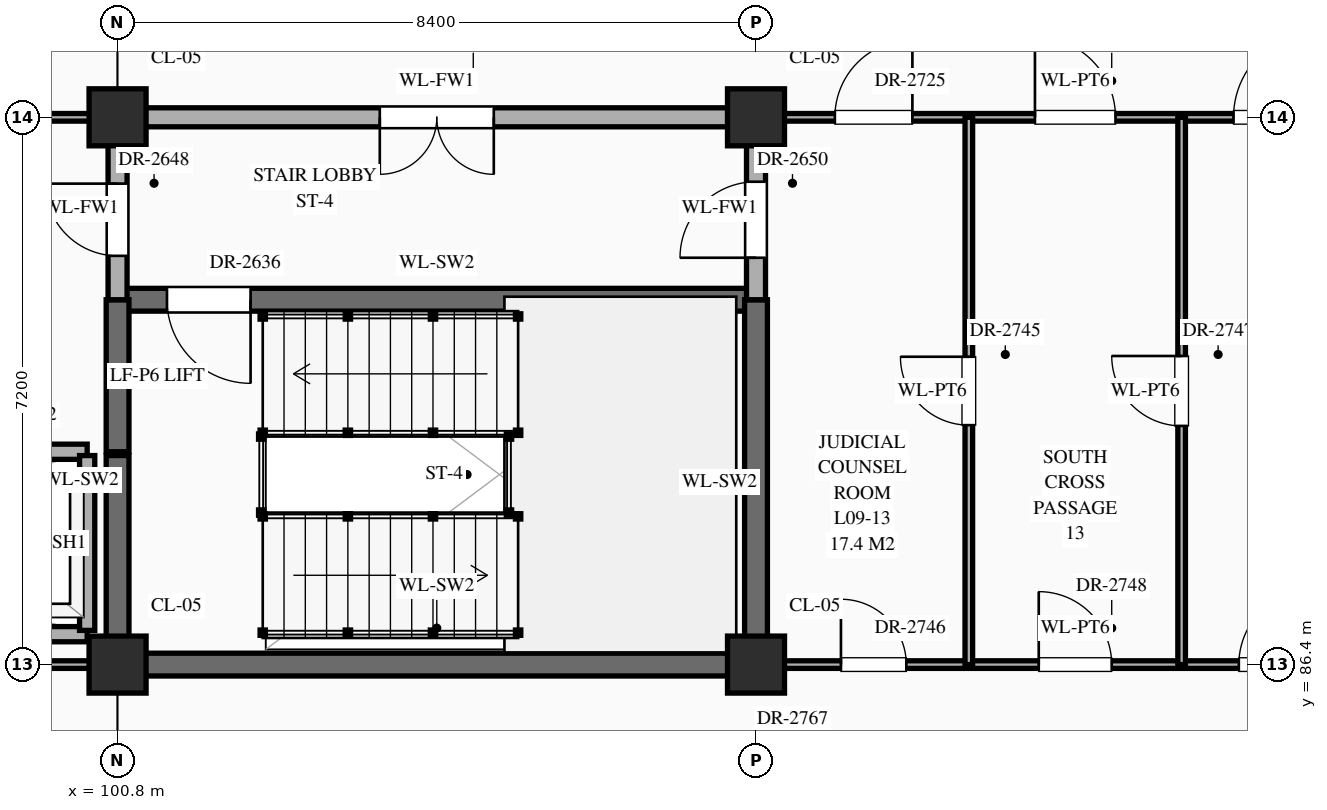
"""IFC4 building model, lengths in metres.
Left out: names, types, materials, properties, quantities, classifications, styles, units other than length and angle.
Written with IfcOpenShell. Run it as: python <this file> out.ifc"""

import sys

from ifc_helpers import new_model, si_unit, direction, frame, frame_2d, origin, origin_2d, place, context, subcontext, project, spatial, rectangle, extrude, element, fill, save


model = new_model("IFC4")
c1 = context("Model", 3, precision=1e-05, world=origin(), true_north=direction((0.0, 1.0)))
c2 = subcontext(c1, "Body", "Model", "MODEL_VIEW")
j1 = project(units=[si_unit("LENGTHUNIT", "METRE"), si_unit("PLANEANGLEUNIT", "RADIAN")], contexts=[c1])
p1 = place(None, origin())
s1 = spatial("IfcSite", under=j1, at=p1, CompositionType="ELEMENT")
p2 = place(p1, origin())
s2 = spatial("IfcBuilding", under=s1, at=p2, CompositionType="ELEMENT")
p3 = place(p2, frame((0.0, 0.0, 39.3)))
s3 = spatial("IfcBuildingStorey", under=s2, at=p3, CompositionType="ELEMENT", Elevation=39.3)
for number, where, z_axis, x_axis in (
    (1, (100.8, 86.4, 0.0), (0.0, 0.0, 1.0), (1.0, 0.0, 0.0)),
    (2, (100.8, 93.6, 0.0), (0.0, 0.0, 1.0), (1.0, 0.0, 0.0)),
    (3, (109.2, 86.4, 0.0), (0.0, 0.0, 1.0), (1.0, 0.0, 0.0)),
    (4, (109.2, 93.6, 0.0), (0.0, 0.0, 1.0), (1.0, 0.0, 0.0)),
):
    element("IfcColumn", number, at=place(p3, frame(where, z_axis=z_axis, x_axis=x_axis)), inside=s3, PredefinedType="COLUMN", context=c2, shape_type="SweptSolid", body=[
        extrude(rectangle(XDim=0.75, YDim=0.75, at=origin_2d()), origin(), (0.0, 0.0, 1.0), 4.2),
    ])
p4 = place(p3, frame((92.45, 86.4, 0.0), z_axis=(0.0, 0.0, 1.0), x_axis=(1.0, 0.0, 0.0)))
e5 = element("IfcWall", 5, at=p4, inside=s3, PredefinedType="STANDARD", context=c2, shape_type="SweptSolid", body=[
    extrude(rectangle(XDim=8.3, YDim=0.1, at=frame_2d((4.15, 0.0))), origin(), (0.0, 0.0, 1.0), 3.1),
])
p5 = place(p3, frame((100.8, 86.4, 0.0), z_axis=(0.0, 0.0, 1.0), x_axis=(1.0, 0.0, 0.0)))
e6 = element("IfcWall", 6, at=p5, inside=s3, PredefinedType="SHEAR", context=c2, shape_type="SweptSolid", body=[
    extrude(rectangle(XDim=8.4, YDim=0.3, at=frame_2d((4.2, 0.0))), origin(), (0.0, 0.0, 1.0), 3.95),
])
p6 = place(p3, frame((109.2, 86.4, 0.0), z_axis=(0.0, 0.0, 1.0), x_axis=(1.0, 0.0, 0.0)))
e7 = element("IfcWall", 7, at=p6, inside=s3, PredefinedType="STANDARD", context=c2, shape_type="SweptSolid", body=[
    extrude(rectangle(XDim=8.4, YDim=0.1, at=frame_2d((4.2, 0.0))), origin(), (0.0, 0.0, 1.0), 3.1),
])
p7 = place(p6, frame((1.117, 0.0, 0.0)))
e8 = element("IfcOpeningElement", 8, at=p7, cuts=e7, PredefinedType="OPENING", context=c2, shape_type="SweptSolid", body=[
    extrude(rectangle(XDim=0.86, YDim=2.1, at=frame_2d((0.43, 1.05))), frame((0.0, 0.062, 0.0), z_axis=(0.0, -1.0, 0.0), x_axis=(1.0, 0.0, 0.0)), (0.0, 0.0, 1.0), 0.124),
])
p8 = place(p6, frame((3.72, 0.0, 0.0)))
e9 = element("IfcOpeningElement", 9, at=p8, cuts=e7, PredefinedType="OPENING", context=c2, shape_type="SweptSolid", body=[
    extrude(rectangle(XDim=0.96, YDim=2.2, at=frame_2d((0.48, 1.1))), frame((0.0, 0.062, 0.0), z_axis=(0.0, -1.0, 0.0), x_axis=(1.0, 0.0, 0.0)), (0.0, 0.0, 1.0), 0.124),
])
p9 = place(p6, frame((6.353, 0.0, 0.0)))
e10 = element("IfcOpeningElement", 10, at=p9, cuts=e7, PredefinedType="OPENING", context=c2, shape_type="SweptSolid", body=[
    extrude(rectangle(XDim=1.0, YDim=2.25, at=frame_2d((0.5, 1.125))), frame((0.0, 0.062, 0.0), z_axis=(0.0, -1.0, 0.0), x_axis=(1.0, 0.0, 0.0)), (0.0, 0.0, 1.0), 0.124),
])
p10 = place(p3, frame((97.9, 86.8, 0.0), z_axis=(0.0, 0.0, 1.0), x_axis=(1.0, 0.0, 0.0)))
e11 = element("IfcWall", 11, at=p10, inside=s3, PredefinedType="STANDARD", context=c2, shape_type="SweptSolid", body=[
    extrude(rectangle(XDim=2.5, YDim=0.2, at=frame_2d((1.25, 0.0))), origin(), (0.0, 0.0, 1.0), 3.95),
])
p11 = place(p3, frame((92.7, 89.2, 0.0), z_axis=(0.0, 0.0, 1.0), x_axis=(1.0, 0.0, 0.0)))
e12 = element("IfcWall", 12, at=p11, inside=s3, PredefinedType="STANDARD", context=c2, shape_type="SweptSolid", body=[
    extrude(rectangle(XDim=7.7, YDim=0.2, at=frame_2d((3.85, 0.0))), origin(), (0.0, 0.0, 1.0), 3.95),
])
p12 = place(p11, frame((0.725, 0.0, 0.0)))
e13 = element("IfcOpeningElement", 13, at=p12, cuts=e12, PredefinedType="OPENING", context=c2, shape_type="SweptSolid", body=[
    extrude(rectangle(XDim=1.1, YDim=2.15, at=frame_2d((0.55, 1.075))), frame((0.0, 0.112, 0.0), z_axis=(0.0, -1.0, 0.0), x_axis=(1.0, 0.0, 0.0)), (0.0, 0.0, 1.0), 0.224),
])
p13 = place(p11, frame((3.3, 0.0, 0.0)))
e14 = element("IfcOpeningElement", 14, at=p13, cuts=e12, PredefinedType="OPENING", context=c2, shape_type="SweptSolid", body=[
    extrude(rectangle(XDim=1.1, YDim=2.15, at=frame_2d((0.55, 1.075))), frame((0.0, 0.112, 0.0), z_axis=(0.0, -1.0, 0.0), x_axis=(1.0, 0.0, 0.0)), (0.0, 0.0, 1.0), 0.224),
])
p14 = place(p11, frame((5.875, 0.0, 0.0)))
e15 = element("IfcOpeningElement", 15, at=p14, cuts=e12, PredefinedType="OPENING", context=c2, shape_type="SweptSolid", body=[
    extrude(rectangle(XDim=1.1, YDim=2.15, at=frame_2d((0.55, 1.075))), frame((0.0, 0.112, 0.0), z_axis=(0.0, -1.0, 0.0), x_axis=(1.0, 0.0, 0.0)), (0.0, 0.0, 1.0), 0.224),
])
p15 = place(p3, frame((100.8, 91.2, 0.0), z_axis=(0.0, 0.0, 1.0), x_axis=(1.0, 0.0, 0.0)))
e16 = element("IfcWall", 16, at=p15, inside=s3, PredefinedType="SHEAR", context=c2, shape_type="SweptSolid", body=[
    extrude(rectangle(XDim=8.4, YDim=0.3, at=frame_2d((4.2, 0.0))), origin(), (0.0, 0.0, 1.0), 3.95),
])
p16 = place(p15, frame((0.65, 0.0, 0.0)))
e17 = element("IfcOpeningElement", 17, at=p16, cuts=e16, PredefinedType="OPENING", context=c2, shape_type="SweptSolid", body=[
    extrude(rectangle(XDim=1.1, YDim=2.2, at=frame_2d((0.55, 1.1))), frame((0.0, 0.162, 0.0), z_axis=(0.0, -1.0, 0.0), x_axis=(1.0, 0.0, 0.0)), (0.0, 0.0, 1.0), 0.324),
])
p17 = place(p3, frame((67.2, 93.6, 0.0), z_axis=(0.0, 0.0, 1.0), x_axis=(1.0, 0.0, 0.0)))
e18 = element("IfcWall", 18, at=p17, inside=s3, PredefinedType="STANDARD", context=c2, shape_type="SweptSolid", body=[
    extrude(rectangle(XDim=33.6, YDim=0.1, at=frame_2d((16.8, 0.0))), origin(), (0.0, 0.0, 1.0), 3.1),
])
p18 = place(p17, frame((3.425, 0.0, 0.0)))
e19 = element("IfcOpeningElement", 19, at=p18, cuts=e18, PredefinedType="OPENING", context=c2, shape_type="SweptSolid", body=[
    extrude(rectangle(XDim=1.55, YDim=2.35, at=frame_2d((0.775, 1.175))), frame((0.0, 0.062, 0.0), z_axis=(0.0, -1.0, 0.0), x_axis=(1.0, 0.0, 0.0)), (0.0, 0.0, 1.0), 0.124),
])
p19 = place(p17, frame((28.55, 0.0, 0.0)))
e20 = element("IfcOpeningElement", 20, at=p19, cuts=e18, PredefinedType="OPENING", context=c2, shape_type="SweptSolid", body=[
    extrude(rectangle(XDim=1.7, YDim=2.45, at=frame_2d((0.85, 1.225))), frame((0.0, 0.062, 0.0), z_axis=(0.0, -1.0, 0.0), x_axis=(1.0, 0.0, 0.0)), (0.0, 0.0, 1.0), 0.124),
])
p20 = place(p17, frame((11.825, 0.0, 0.0)))
e21 = element("IfcOpeningElement", 21, at=p20, cuts=e18, PredefinedType="OPENING", context=c2, shape_type="SweptSolid", body=[
    extrude(rectangle(XDim=1.55, YDim=2.35, at=frame_2d((0.775, 1.175))), frame((0.0, 0.062, 0.0), z_axis=(0.0, -1.0, 0.0), x_axis=(1.0, 0.0, 0.0)), (0.0, 0.0, 1.0), 0.124),
])
p21 = place(p17, frame((17.708, 0.0, 0.0)))
e22 = element("IfcOpeningElement", 22, at=p21, cuts=e18, PredefinedType="OPENING", context=c2, shape_type="SweptSolid", body=[
    extrude(rectangle(XDim=1.28, YDim=2.35, at=frame_2d((0.64, 1.175))), frame((0.0, 0.062, 0.0), z_axis=(0.0, -1.0, 0.0), x_axis=(1.0, 0.0, 0.0)), (0.0, 0.0, 1.0), 0.124),
])
p22 = place(p17, frame((20.53, 0.0, 0.0)))
e23 = element("IfcOpeningElement", 23, at=p22, cuts=e18, PredefinedType="OPENING", context=c2, shape_type="SweptSolid", body=[
    extrude(rectangle(XDim=0.94, YDim=2.3, at=frame_2d((0.47, 1.15))), frame((0.0, 0.062, 0.0), z_axis=(0.0, -1.0, 0.0), x_axis=(1.0, 0.0, 0.0)), (0.0, 0.0, 1.0), 0.124),
])
p23 = place(p17, frame((23.163, 0.0, 0.0)))
e24 = element("IfcOpeningElement", 24, at=p23, cuts=e18, PredefinedType="OPENING", context=c2, shape_type="SweptSolid", body=[
    extrude(rectangle(XDim=0.98, YDim=2.35, at=frame_2d((0.49, 1.175))), frame((0.0, 0.062, 0.0), z_axis=(0.0, -1.0, 0.0), x_axis=(1.0, 0.0, 0.0)), (0.0, 0.0, 1.0), 0.124),
])
p24 = place(p3, frame((100.8, 93.6, 0.0), z_axis=(0.0, 0.0, 1.0), x_axis=(1.0, 0.0, 0.0)))
e25 = element("IfcWall", 25, at=p24, inside=s3, PredefinedType="STANDARD", context=c2, shape_type="SweptSolid", body=[
    extrude(rectangle(XDim=8.4, YDim=0.25, at=frame_2d((4.2, 0.0))), origin(), (0.0, 0.0, 1.0), 3.1),
])
p25 = place(p24, frame((3.45, 0.0, 0.0)))
e26 = element("IfcOpeningElement", 26, at=p25, cuts=e25, PredefinedType="OPENING", context=c2, shape_type="SweptSolid", body=[
    extrude(rectangle(XDim=1.5, YDim=2.25, at=frame_2d((0.75, 1.125))), frame((0.0, 0.137, 0.0), z_axis=(0.0, -1.0, 0.0), x_axis=(1.0, 0.0, 0.0)), (0.0, 0.0, 1.0), 0.274),
])
p26 = place(p3, frame((109.2, 93.6, 0.0), z_axis=(0.0, 0.0, 1.0), x_axis=(1.0, 0.0, 0.0)))
e27 = element("IfcWall", 27, at=p26, inside=s3, PredefinedType="STANDARD", context=c2, shape_type="SweptSolid", body=[
    extrude(rectangle(XDim=8.4, YDim=0.1, at=frame_2d((4.2, 0.0))), origin(), (0.0, 0.0, 1.0), 3.1),
])
p27 = place(p26, frame((1.038, 0.0, 0.0)))
e28 = element("IfcOpeningElement", 28, at=p27, cuts=e27, PredefinedType="OPENING", context=c2, shape_type="SweptSolid", body=[
    extrude(rectangle(XDim=1.02, YDim=2.4, at=frame_2d((0.51, 1.2))), frame((0.0, 0.062, 0.0), z_axis=(0.0, -1.0, 0.0), x_axis=(1.0, 0.0, 0.0)), (0.0, 0.0, 1.0), 0.124),
])
p28 = place(p26, frame((3.67, 0.0, 0.0)))
e29 = element("IfcOpeningElement", 29, at=p28, cuts=e27, PredefinedType="OPENING", context=c2, shape_type="SweptSolid", body=[
    extrude(rectangle(XDim=1.06, YDim=2.4, at=frame_2d((0.53, 1.2))), frame((0.0, 0.062, 0.0), z_axis=(0.0, -1.0, 0.0), x_axis=(1.0, 0.0, 0.0)), (0.0, 0.0, 1.0), 0.124),
])
p29 = place(p26, frame((6.282, 0.0, 0.0)))
e30 = element("IfcOpeningElement", 30, at=p29, cuts=e27, PredefinedType="OPENING", context=c2, shape_type="SweptSolid", body=[
    extrude(rectangle(XDim=1.14, YDim=2.4, at=frame_2d((0.57, 1.2))), frame((0.0, 0.062, 0.0), z_axis=(0.0, -1.0, 0.0), x_axis=(1.0, 0.0, 0.0)), (0.0, 0.0, 1.0), 0.124),
])
p30 = place(p3, frame((100.4, 86.85, 0.0), z_axis=(0.0, 0.0, 1.0), x_axis=(0.0, 1.0, 0.0)))
e31 = element("IfcWall", 31, at=p30, inside=s3, PredefinedType="STANDARD", context=c2, shape_type="SweptSolid", body=[
    extrude(rectangle(XDim=2.3, YDim=0.2, at=frame_2d((1.15, 0.0))), origin(), (0.0, 0.0, 1.0), 3.95),
])
p31 = place(p3, frame((100.8, 86.45, 0.0), z_axis=(0.0, 0.0, 1.0), x_axis=(0.0, 1.0, 0.0)))
e32 = element("IfcWall", 32, at=p31, inside=s3, PredefinedType="SHEAR", context=c2, shape_type="SweptSolid", body=[
    extrude(rectangle(XDim=2.7, YDim=0.3, at=frame_2d((1.35, 0.0))), origin(), (0.0, 0.0, 1.0), 3.95),
])
p32 = place(p3, frame((100.8, 89.2, 0.0), z_axis=(0.0, 0.0, 1.0), x_axis=(0.0, 1.0, 0.0)))
e33 = element("IfcWall", 33, at=p32, inside=s3, PredefinedType="SHEAR", context=c2, shape_type="SweptSolid", body=[
    extrude(rectangle(XDim=2.0, YDim=0.3, at=frame_2d((1.0, 0.0))), origin(), (0.0, 0.0, 1.0), 3.95),
])
p33 = place(p3, frame((100.8, 91.2, 0.0), z_axis=(0.0, 0.0, 1.0), x_axis=(0.0, 1.0, 0.0)))
e34 = element("IfcWall", 34, at=p33, inside=s3, PredefinedType="STANDARD", context=c2, shape_type="SweptSolid", body=[
    extrude(rectangle(XDim=2.4, YDim=0.25, at=frame_2d((1.2, 0.0))), origin(), (0.0, 0.0, 1.0), 3.2),
])
p34 = place(p33, frame((0.577, 0.0, 0.0)))
e35 = element("IfcOpeningElement", 35, at=p34, cuts=e34, PredefinedType="OPENING", context=c2, shape_type="SweptSolid", body=[
    extrude(rectangle(XDim=0.95, YDim=2.15, at=frame_2d((0.475, 1.075))), frame((0.0, 0.137, 0.0), z_axis=(0.0, -1.0, 0.0), x_axis=(1.0, 0.0, 0.0)), (0.0, 0.0, 1.0), 0.274),
])
p35 = place(p3, frame((109.2, 86.4, 0.0), z_axis=(0.0, 0.0, 1.0), x_axis=(0.0, 1.0, 0.0)))
e36 = element("IfcWall", 36, at=p35, inside=s3, PredefinedType="SHEAR", context=c2, shape_type="SweptSolid", body=[
    extrude(rectangle(XDim=4.8, YDim=0.3, at=frame_2d((2.4, 0.0))), origin(), (0.0, 0.0, 1.0), 3.95),
])
p36 = place(p3, frame((109.2, 91.2, 0.0), z_axis=(0.0, 0.0, 1.0), x_axis=(0.0, 1.0, 0.0)))
e37 = element("IfcWall", 37, at=p36, inside=s3, PredefinedType="STANDARD", context=c2, shape_type="SweptSolid", body=[
    extrude(rectangle(XDim=2.4, YDim=0.25, at=frame_2d((1.2, 0.0))), origin(), (0.0, 0.0, 1.0), 3.2),
])
p37 = place(p36, frame((0.552, 0.0, 0.0)))
e38 = element("IfcOpeningElement", 38, at=p37, cuts=e37, PredefinedType="OPENING", context=c2, shape_type="SweptSolid", body=[
    extrude(rectangle(XDim=1.0, YDim=2.2, at=frame_2d((0.5, 1.1))), frame((0.0, 0.137, 0.0), z_axis=(0.0, -1.0, 0.0), x_axis=(1.0, 0.0, 0.0)), (0.0, 0.0, 1.0), 0.274),
])
p38 = place(p3, frame((112.0, 86.4, 0.0), z_axis=(0.0, 0.0, 1.0), x_axis=(0.0, 1.0, 0.0)))
e39 = element("IfcWall", 39, at=p38, inside=s3, PredefinedType="STANDARD", context=c2, shape_type="SweptSolid", body=[
    extrude(rectangle(XDim=7.2, YDim=0.1, at=frame_2d((3.6, 0.0))), origin(), (0.0, 0.0, 1.0), 3.95),
])
p39 = place(p38, frame((3.15, 0.0, 0.0)))
e40 = element("IfcOpeningElement", 40, at=p39, cuts=e39, PredefinedType="OPENING", context=c2, shape_type="SweptSolid", body=[
    extrude(rectangle(XDim=0.9, YDim=2.15, at=frame_2d((0.45, 1.075))), frame((0.0, 0.062, 0.0), z_axis=(0.0, -1.0, 0.0), x_axis=(1.0, 0.0, 0.0)), (0.0, 0.0, 1.0), 0.124),
])
p40 = place(p3, frame((114.8, 86.4, 0.0), z_axis=(0.0, 0.0, 1.0), x_axis=(0.0, 1.0, 0.0)))
e41 = element("IfcWall", 41, at=p40, inside=s3, PredefinedType="STANDARD", context=c2, shape_type="SweptSolid", body=[
    extrude(rectangle(XDim=7.2, YDim=0.1, at=frame_2d((3.6, 0.0))), origin(), (0.0, 0.0, 1.0), 3.95),
])
p41 = place(p40, frame((3.14, 0.0, 0.0)))
e42 = element("IfcOpeningElement", 42, at=p41, cuts=e41, PredefinedType="OPENING", context=c2, shape_type="SweptSolid", body=[
    extrude(rectangle(XDim=0.92, YDim=2.15, at=frame_2d((0.46, 1.075))), frame((0.0, 0.062, 0.0), z_axis=(0.0, -1.0, 0.0), x_axis=(1.0, 0.0, 0.0)), (0.0, 0.0, 1.0), 0.124),
])
p42 = place(p16, frame((1.1, 0.0, 0.0), z_axis=(0.0, 0.0, 1.0), x_axis=(-1.0, 0.0, 0.0)))
e43 = element("IfcDoor", 43, at=p42, inside=s3, OperationType="SINGLE_SWING_LEFT", PredefinedType="DOOR", context=c2, shape_type="SweptSolid", body=[
    extrude(rectangle(XDim=1.1, YDim=2.2, at=frame_2d((0.55, 1.1))), frame((0.0, 0.025, 0.0), z_axis=(0.0, -1.0, 0.0), x_axis=(1.0, 0.0, 0.0)), (0.0, 0.0, 1.0), 0.05),
])
fill(e17, e43)
p43 = place(p34, origin())
e44 = element("IfcDoor", 44, at=p43, inside=s3, OperationType="SINGLE_SWING_RIGHT", PredefinedType="DOOR", context=c2, shape_type="SweptSolid", body=[
    extrude(rectangle(XDim=0.95, YDim=2.15, at=frame_2d((0.475, 1.075))), frame((0.0, 0.025, 0.0), z_axis=(0.0, -1.0, 0.0), x_axis=(1.0, 0.0, 0.0)), (0.0, 0.0, 1.0), 0.05),
])
fill(e35, e44)
p44 = place(p25, frame((1.5, 0.0, 0.0), z_axis=(0.0, 0.0, 1.0), x_axis=(-1.0, 0.0, 0.0)))
e45 = element("IfcDoor", 45, at=p44, inside=s3, OperationType="DOUBLE_DOOR_SINGLE_SWING", PredefinedType="DOOR", context=c2, shape_type="SweptSolid", body=[
    extrude(rectangle(XDim=1.5, YDim=2.25, at=frame_2d((0.75, 1.125))), frame((0.0, 0.025, 0.0), z_axis=(0.0, -1.0, 0.0), x_axis=(1.0, 0.0, 0.0)), (0.0, 0.0, 1.0), 0.05),
])
fill(e26, e45)
p45 = place(p37, origin())
e46 = element("IfcDoor", 46, at=p45, inside=s3, OperationType="SINGLE_SWING_LEFT", PredefinedType="DOOR", context=c2, shape_type="SweptSolid", body=[
    extrude(rectangle(XDim=1.0, YDim=2.2, at=frame_2d((0.5, 1.1))), frame((0.0, 0.025, 0.0), z_axis=(0.0, -1.0, 0.0), x_axis=(1.0, 0.0, 0.0)), (0.0, 0.0, 1.0), 0.05),
])
fill(e38, e46)
p46 = place(p27, origin())
e47 = element("IfcDoor", 47, at=p46, inside=s3, OperationType="SINGLE_SWING_RIGHT", PredefinedType="DOOR", context=c2, shape_type="SweptSolid", body=[
    extrude(rectangle(XDim=1.02, YDim=2.4, at=frame_2d((0.51, 1.2))), frame((0.0, 0.025, 0.0), z_axis=(0.0, -1.0, 0.0), x_axis=(1.0, 0.0, 0.0)), (0.0, 0.0, 1.0), 0.05),
])
fill(e28, e47)
p47 = place(p28, origin())
e48 = element("IfcDoor", 48, at=p47, inside=s3, OperationType="SINGLE_SWING_LEFT", PredefinedType="DOOR", context=c2, shape_type="SweptSolid", body=[
    extrude(rectangle(XDim=1.06, YDim=2.4, at=frame_2d((0.53, 1.2))), frame((0.0, 0.025, 0.0), z_axis=(0.0, -1.0, 0.0), x_axis=(1.0, 0.0, 0.0)), (0.0, 0.0, 1.0), 0.05),
])
fill(e29, e48)
p48 = place(p29, origin())
e49 = element("IfcDoor", 49, at=p48, inside=s3, OperationType="SINGLE_SWING_RIGHT", PredefinedType="DOOR", context=c2, shape_type="SweptSolid", body=[
    extrude(rectangle(XDim=1.14, YDim=2.4, at=frame_2d((0.57, 1.2))), frame((0.0, 0.025, 0.0), z_axis=(0.0, -1.0, 0.0), x_axis=(1.0, 0.0, 0.0)), (0.0, 0.0, 1.0), 0.05),
])
fill(e30, e49)
p49 = place(p39, origin())
e50 = element("IfcDoor", 50, at=p49, inside=s3, OperationType="SINGLE_SWING_RIGHT", PredefinedType="DOOR", context=c2, shape_type="SweptSolid", body=[
    extrude(rectangle(XDim=0.9, YDim=2.15, at=frame_2d((0.45, 1.075))), frame((0.0, 0.025, 0.0), z_axis=(0.0, -1.0, 0.0), x_axis=(1.0, 0.0, 0.0)), (0.0, 0.0, 1.0), 0.05),
])
fill(e40, e50)
p50 = place(p7, origin())
e51 = element("IfcDoor", 51, at=p50, inside=s3, OperationType="SINGLE_SWING_LEFT", PredefinedType="DOOR", context=c2, shape_type="SweptSolid", body=[
    extrude(rectangle(XDim=0.86, YDim=2.1, at=frame_2d((0.43, 1.05))), frame((0.0, 0.025, 0.0), z_axis=(0.0, -1.0, 0.0), x_axis=(1.0, 0.0, 0.0)), (0.0, 0.0, 1.0), 0.05),
])
fill(e8, e51)
p51 = place(p41, origin())
e52 = element("IfcDoor", 52, at=p51, inside=s3, OperationType="SINGLE_SWING_RIGHT", PredefinedType="DOOR", context=c2, shape_type="SweptSolid", body=[
    extrude(rectangle(XDim=0.92, YDim=2.15, at=frame_2d((0.46, 1.075))), frame((0.0, 0.025, 0.0), z_axis=(0.0, -1.0, 0.0), x_axis=(1.0, 0.0, 0.0)), (0.0, 0.0, 1.0), 0.05),
])
fill(e42, e52)
p52 = place(p8, origin())
e53 = element("IfcDoor", 53, at=p52, inside=s3, OperationType="SINGLE_SWING_LEFT", PredefinedType="DOOR", context=c2, shape_type="SweptSolid", body=[
    extrude(rectangle(XDim=0.96, YDim=2.2, at=frame_2d((0.48, 1.1))), frame((0.0, 0.025, 0.0), z_axis=(0.0, -1.0, 0.0), x_axis=(1.0, 0.0, 0.0)), (0.0, 0.0, 1.0), 0.05),
])
fill(e9, e53)
p53 = place(p9, origin())
e54 = element("IfcDoor", 54, at=p53, inside=s3, OperationType="SINGLE_SWING_RIGHT", PredefinedType="DOOR", context=c2, shape_type="SweptSolid", body=[
    extrude(rectangle(XDim=1.0, YDim=2.25, at=frame_2d((0.5, 1.125))), frame((0.0, 0.025, 0.0), z_axis=(0.0, -1.0, 0.0), x_axis=(1.0, 0.0, 0.0)), (0.0, 0.0, 1.0), 0.05),
])
fill(e10, e54)
save(model, sys.argv[1])
